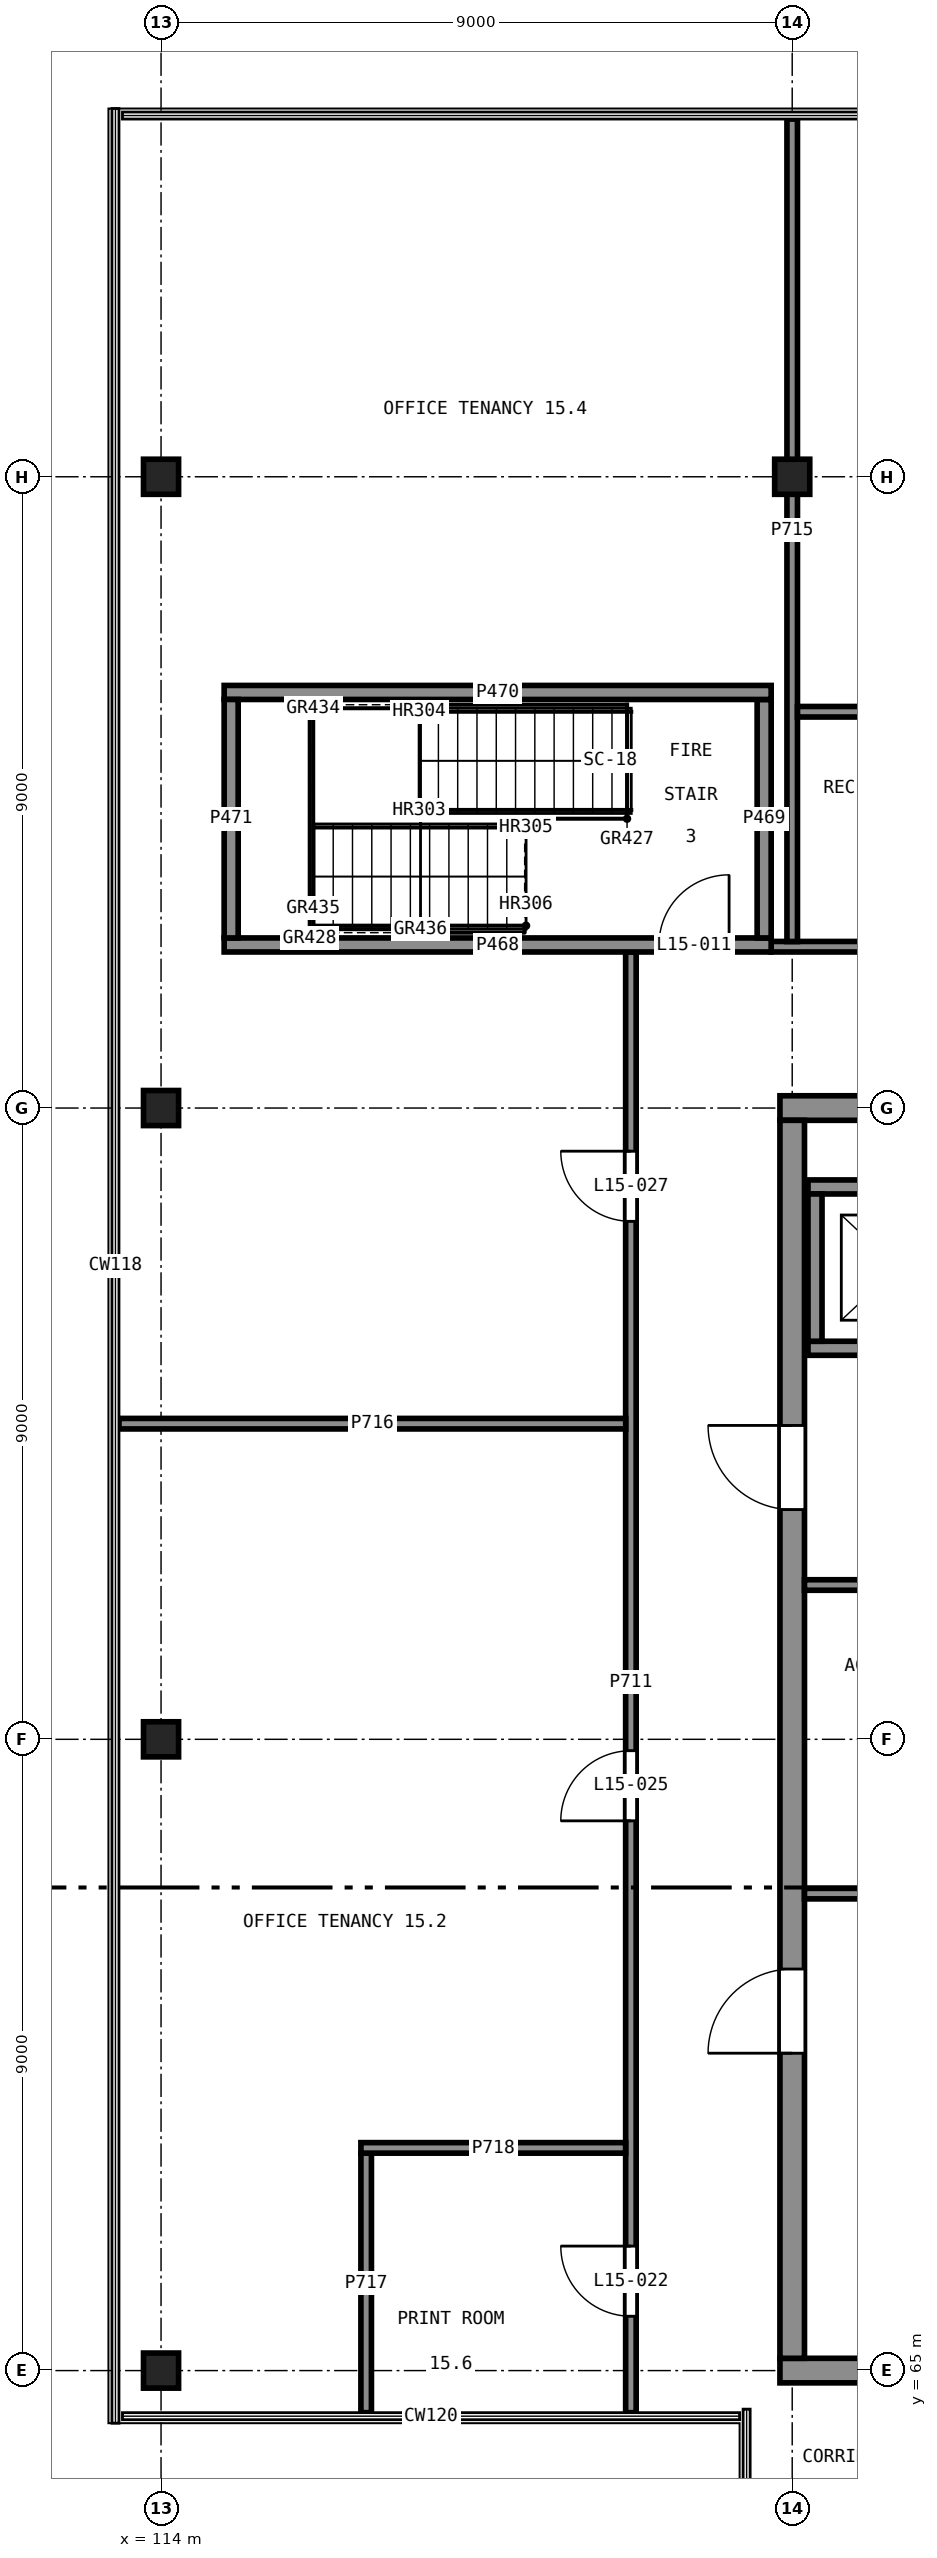
"""IFC4 building model, lengths in metres.
Left out: names, types, materials, properties, quantities, classifications, styles, units other than length and angle.
Written with IfcOpenShell. Run it as: python <this file> out.ifc"""

import sys

from ifc_helpers import new_model, si_unit, direction, frame, frame_2d, origin, origin_2d, place, context, subcontext, project, spatial, rectangle, extrude, element, fill, save


model = new_model("IFC4")
c1 = context("Model", 3, precision=1e-05, world=origin(), true_north=direction((0.0, 1.0)))
c2 = subcontext(c1, "Body", "Model", "MODEL_VIEW")
j1 = project(units=[si_unit("LENGTHUNIT", "METRE"), si_unit("PLANEANGLEUNIT", "RADIAN")], contexts=[c1])
p1 = place(None, origin())
s1 = spatial("IfcSite", under=j1, at=p1, CompositionType="ELEMENT")
p2 = place(p1, origin())
s2 = spatial("IfcBuilding", under=s1, at=p2, CompositionType="ELEMENT")
p3 = place(p2, frame((0.0, 0.0, 61.5)))
s3 = spatial("IfcBuildingStorey", under=s2, at=p3, CompositionType="ELEMENT", Elevation=61.5)
for number, where, z_axis, x_axis in (
    (1, (114.0, 65.0, 0.0), (0.0, 0.0, 1.0), (1.0, 0.0, 0.0)),
    (2, (114.0, 74.0, 0.0), (0.0, 0.0, 1.0), (1.0, 0.0, 0.0)),
    (3, (114.0, 83.0, 0.0), (0.0, 0.0, 1.0), (1.0, 0.0, 0.0)),
    (4, (114.0, 92.0, 0.0), (0.0, 0.0, 1.0), (1.0, 0.0, 0.0)),
    (5, (123.0, 92.0, 0.0), (0.0, 0.0, 1.0), (1.0, 0.0, 0.0)),
):
    element("IfcColumn", number, at=place(p3, frame(where, z_axis=z_axis, x_axis=x_axis)), inside=s3, PredefinedType="COLUMN", context=c2, shape_type="SweptSolid", body=[
        extrude(rectangle(XDim=0.5, YDim=0.5, at=origin_2d()), origin(), (0.0, 0.0, 1.0), 4.0),
    ])
for number, where, z_axis, x_axis in (
    (6, (122.825, 65.0, 0.0), (0.0, 0.0, 1.0), (1.0, 0.0, 0.0)),
    (7, (141.175, 83.0, 0.0), (0.0, 0.0, 1.0), (-1.0, 0.0, 0.0)),
):
    element("IfcWall", number, at=place(p3, frame(where, z_axis=z_axis, x_axis=x_axis)), inside=s3, PredefinedType="SHEAR", context=c2, shape_type="SweptSolid", body=[
        extrude(rectangle(XDim=18.35, YDim=0.35, at=frame_2d((9.175, 0.0))), origin(), (0.0, 0.0, 1.0), 4.0),
    ])
p4 = place(p3, frame((123.0, 82.825, 0.0), z_axis=(0.0, 0.0, 1.0), x_axis=(0.0, -1.0, 0.0)))
e8 = element("IfcWall", 8, at=p4, inside=s3, PredefinedType="SHEAR", context=c2, shape_type="SweptSolid", body=[
    extrude(rectangle(XDim=17.65, YDim=0.35, at=frame_2d((8.825, 0.0))), origin(), (0.0, 0.0, 1.0), 4.0),
])
p5 = place(p4, frame((12.1, 0.0, 0.0)))
e9 = element("IfcOpeningElement", 9, at=p5, cuts=e8, PredefinedType="OPENING", context=c2, shape_type="SweptSolid", body=[
    extrude(rectangle(XDim=1.2, YDim=2.1, at=frame_2d((0.6, 1.05))), frame((0.0, 0.185, 0.0), z_axis=(0.0, -1.0, 0.0), x_axis=(1.0, 0.0, 0.0)), (0.0, 0.0, 1.0), 0.37),
])
p6 = place(p4, frame((4.35, 0.0, 0.0)))
e10 = element("IfcOpeningElement", 10, at=p6, cuts=e8, PredefinedType="OPENING", context=c2, shape_type="SweptSolid", body=[
    extrude(rectangle(XDim=1.2, YDim=2.1, at=frame_2d((0.6, 1.05))), frame((0.0, 0.185, 0.0), z_axis=(0.0, -1.0, 0.0), x_axis=(1.0, 0.0, 0.0)), (0.0, 0.0, 1.0), 0.37),
])
p7 = place(p3, frame((123.225, 79.575, 0.0), z_axis=(0.0, 0.0, 1.0), x_axis=(1.0, 0.0, 0.0)))
e11 = element("IfcWall", 11, at=p7, inside=s3, PredefinedType="SHEAR", context=c2, shape_type="SweptSolid", body=[
    extrude(rectangle(XDim=2.55, YDim=0.2, at=frame_2d((1.275, 0.0))), origin(), (0.0, 0.0, 1.0), 4.0),
])
p8 = place(p7, frame((0.725, 0.0, 0.0)))
e12 = element("IfcOpeningElement", 12, at=p8, cuts=e11, PredefinedType="OPENING", context=c2, shape_type="SweptSolid", body=[
    extrude(rectangle(XDim=1.1, YDim=2.1, at=frame_2d((0.55, 1.05))), frame((0.0, 0.11, 0.0), z_axis=(0.0, -1.0, 0.0), x_axis=(1.0, 0.0, 0.0)), (0.0, 0.0, 1.0), 0.22),
])
p9 = place(p3, frame((125.775, 81.875, 0.0), z_axis=(0.0, 0.0, 1.0), x_axis=(-1.0, 0.0, 0.0)))
e13 = element("IfcWall", 13, at=p9, inside=s3, PredefinedType="SHEAR", context=c2, shape_type="SweptSolid", body=[
    extrude(rectangle(XDim=2.55, YDim=0.2, at=frame_2d((1.275, 0.0))), origin(), (0.0, 0.0, 1.0), 4.0),
])
p10 = place(p3, frame((123.325, 81.775, 0.0), z_axis=(0.0, 0.0, 1.0), x_axis=(0.0, -1.0, 0.0)))
e14 = element("IfcWall", 14, at=p10, inside=s3, PredefinedType="SHEAR", context=c2, shape_type="SweptSolid", body=[
    extrude(rectangle(XDim=2.1, YDim=0.2, at=frame_2d((1.05, 0.0))), origin(), (0.0, 0.0, 1.0), 4.0),
])
p11 = place(p3, frame((114.9, 85.325, 0.0), z_axis=(0.0, 0.0, 1.0), x_axis=(1.0, 0.0, 0.0)))
e15 = element("IfcWall", 15, at=p11, inside=s3, PredefinedType="SHEAR", context=c2, shape_type="SweptSolid", body=[
    extrude(rectangle(XDim=7.8, YDim=0.2, at=frame_2d((3.9, 0.0))), origin(), (0.0, 0.0, 1.0), 3.58),
])
p12 = place(p11, frame((6.2, 0.0, 0.0)))
e16 = element("IfcOpeningElement", 16, at=p12, cuts=e15, PredefinedType="OPENING", context=c2, shape_type="SweptSolid", body=[
    extrude(rectangle(XDim=1.0, YDim=2.1, at=frame_2d((0.5, 1.05))), frame((0.0, 0.11, 0.0), z_axis=(0.0, -1.0, 0.0), x_axis=(1.0, 0.0, 0.0)), (0.0, 0.0, 1.0), 0.22),
])
p13 = place(p3, frame((122.6, 85.425, 0.0), z_axis=(0.0, 0.0, 1.0), x_axis=(0.0, 1.0, 0.0)))
e17 = element("IfcWall", 17, at=p13, inside=s3, PredefinedType="SHEAR", context=c2, shape_type="SweptSolid", body=[
    extrude(rectangle(XDim=3.4, YDim=0.2, at=frame_2d((1.7, 0.0))), origin(), (0.0, 0.0, 1.0), 3.58),
])
p14 = place(p3, frame((122.7, 88.925, 0.0), z_axis=(0.0, 0.0, 1.0), x_axis=(-1.0, 0.0, 0.0)))
e18 = element("IfcWall", 18, at=p14, inside=s3, PredefinedType="SHEAR", context=c2, shape_type="SweptSolid", body=[
    extrude(rectangle(XDim=7.8, YDim=0.2, at=frame_2d((3.9, 0.0))), origin(), (0.0, 0.0, 1.0), 3.58),
])
p15 = place(p3, frame((115.0, 88.825, 0.0), z_axis=(0.0, 0.0, 1.0), x_axis=(0.0, -1.0, 0.0)))
e19 = element("IfcWall", 19, at=p15, inside=s3, PredefinedType="SHEAR", context=c2, shape_type="SweptSolid", body=[
    extrude(rectangle(XDim=3.4, YDim=0.2, at=frame_2d((1.7, 0.0))), origin(), (0.0, 0.0, 1.0), 3.58),
])
p16 = place(p3, frame((123.175, 71.8, 0.0), z_axis=(0.0, 0.0, 1.0), x_axis=(1.0, 0.0, 0.0)))
e20 = element("IfcWall", 20, at=p16, inside=s3, PredefinedType="PARTITIONING", context=c2, shape_type="SweptSolid", body=[
    extrude(rectangle(XDim=2.575, YDim=0.15, at=frame_2d((1.288, 0.0))), origin(), (0.0, 0.0, 1.0), 3.58),
])
p17 = place(p16, frame((0.85, 0.0, 0.0)))
e21 = element("IfcOpeningElement", 21, at=p17, cuts=e20, PredefinedType="OPENING", context=c2, shape_type="SweptSolid", body=[
    extrude(rectangle(XDim=1.0, YDim=2.1, at=frame_2d((0.5, 1.05))), frame((0.0, 0.085, 0.0), z_axis=(0.0, -1.0, 0.0), x_axis=(1.0, 0.0, 0.0)), (0.0, 0.0, 1.0), 0.17),
])
p18 = place(p3, frame((123.175, 76.2, 0.0), z_axis=(0.0, 0.0, 1.0), x_axis=(1.0, 0.0, 0.0)))
e22 = element("IfcWall", 22, at=p18, inside=s3, PredefinedType="PARTITIONING", context=c2, shape_type="SweptSolid", body=[
    extrude(rectangle(XDim=2.575, YDim=0.15, at=frame_2d((1.288, 0.0))), origin(), (0.0, 0.0, 1.0), 3.58),
])
p19 = place(p3, frame((120.7, 64.4, 0.0), z_axis=(0.0, 0.0, 1.0), x_axis=(0.0, 1.0, 0.0)))
e23 = element("IfcWall", 23, at=p19, inside=s3, PredefinedType="PARTITIONING", context=c2, shape_type="SweptSolid", body=[
    extrude(rectangle(XDim=20.825, YDim=0.15, at=frame_2d((10.413, 0.0))), origin(), (0.0, 0.0, 1.0), 3.58),
])
p20 = place(p19, frame((1.375, 0.0, 0.0)))
e24 = element("IfcOpeningElement", 24, at=p20, cuts=e23, PredefinedType="OPENING", context=c2, shape_type="SweptSolid", body=[
    extrude(rectangle(XDim=1.0, YDim=2.1, at=frame_2d((0.5, 1.05))), frame((0.0, 0.085, 0.0), z_axis=(0.0, -1.0, 0.0), x_axis=(1.0, 0.0, 0.0)), (0.0, 0.0, 1.0), 0.17),
])
p21 = place(p19, frame((8.438, 0.0, 0.0)))
e25 = element("IfcOpeningElement", 25, at=p21, cuts=e23, PredefinedType="OPENING", context=c2, shape_type="SweptSolid", body=[
    extrude(rectangle(XDim=1.0, YDim=2.1, at=frame_2d((0.5, 1.05))), frame((0.0, 0.085, 0.0), z_axis=(0.0, -1.0, 0.0), x_axis=(1.0, 0.0, 0.0)), (0.0, 0.0, 1.0), 0.17),
])
p22 = place(p19, frame((16.985, 0.0, 0.0)))
e26 = element("IfcOpeningElement", 26, at=p22, cuts=e23, PredefinedType="OPENING", context=c2, shape_type="SweptSolid", body=[
    extrude(rectangle(XDim=1.0, YDim=2.1, at=frame_2d((0.5, 1.05))), frame((0.0, 0.085, 0.0), z_axis=(0.0, -1.0, 0.0), x_axis=(1.0, 0.0, 0.0)), (0.0, 0.0, 1.0), 0.17),
])
p23 = place(p3, frame((122.7, 85.3, 0.0), z_axis=(0.0, 0.0, 1.0), x_axis=(1.0, 0.0, 0.0)))
e27 = element("IfcWall", 27, at=p23, inside=s3, PredefinedType="PARTITIONING", context=c2, shape_type="SweptSolid", body=[
    extrude(rectangle(XDim=9.9, YDim=0.15, at=frame_2d((4.95, 0.0))), origin(), (0.0, 0.0, 1.0), 3.58),
])
p24 = place(p23, frame((1.875, 0.0, 0.0)))
e28 = element("IfcOpeningElement", 28, at=p24, cuts=e27, PredefinedType="OPENING", context=c2, shape_type="SweptSolid", body=[
    extrude(rectangle(XDim=1.0, YDim=2.1, at=frame_2d((0.5, 1.05))), frame((0.0, 0.085, 0.0), z_axis=(0.0, -1.0, 0.0), x_axis=(1.0, 0.0, 0.0)), (0.0, 0.0, 1.0), 0.17),
])
p25 = place(p23, frame((6.698, 0.0, 0.0)))
e29 = element("IfcOpeningElement", 29, at=p25, cuts=e27, PredefinedType="OPENING", context=c2, shape_type="SweptSolid", body=[
    extrude(rectangle(XDim=1.0, YDim=2.1, at=frame_2d((0.5, 1.05))), frame((0.0, 0.085, 0.0), z_axis=(0.0, -1.0, 0.0), x_axis=(1.0, 0.0, 0.0)), (0.0, 0.0, 1.0), 0.17),
])
p26 = place(p3, frame((123.0, 85.374, 0.0), z_axis=(0.0, 0.0, 1.0), x_axis=(0.0, 1.0, 0.0)))
e30 = element("IfcWall", 30, at=p26, inside=s3, PredefinedType="PARTITIONING", context=c2, shape_type="SweptSolid", body=[
    extrude(rectangle(XDim=11.726, YDim=0.15, at=frame_2d((5.863, 0.0))), origin(), (0.0, 0.0, 1.0), 2.68),
])
p27 = place(p3, frame((113.4, 78.5, 0.0), z_axis=(0.0, 0.0, 1.0), x_axis=(1.0, 0.0, 0.0)))
e31 = element("IfcWall", 31, at=p27, inside=s3, PredefinedType="PARTITIONING", context=c2, shape_type="SweptSolid", body=[
    extrude(rectangle(XDim=7.226, YDim=0.15, at=frame_2d((3.613, 0.0))), origin(), (0.0, 0.0, 1.0), 3.58),
])
p28 = place(p3, frame((116.925, 64.4, 0.0), z_axis=(0.0, 0.0, 1.0), x_axis=(0.0, 1.0, 0.0)))
e32 = element("IfcWall", 32, at=p28, inside=s3, PredefinedType="PARTITIONING", context=c2, shape_type="SweptSolid", body=[
    extrude(rectangle(XDim=3.7, YDim=0.15, at=frame_2d((1.85, 0.0))), origin(), (0.0, 0.0, 1.0), 3.58),
])
p29 = place(p3, frame((120.625, 68.175, 0.0), z_axis=(0.0, 0.0, 1.0), x_axis=(-1.0, 0.0, 0.0)))
e33 = element("IfcWall", 33, at=p29, inside=s3, PredefinedType="PARTITIONING", context=c2, shape_type="SweptSolid", body=[
    extrude(rectangle(XDim=3.775, YDim=0.15, at=frame_2d((1.887, 0.0))), origin(), (0.0, 0.0, 1.0), 3.58),
])
p30 = place(p3, frame((123.075, 88.65, 0.0), z_axis=(0.0, 0.0, 1.0), x_axis=(1.0, 0.0, 0.0)))
e34 = element("IfcWall", 34, at=p30, inside=s3, PredefinedType="PARTITIONING", context=c2, shape_type="SweptSolid", body=[
    extrude(rectangle(XDim=4.0, YDim=0.15, at=frame_2d((2.0, 0.0))), origin(), (0.0, 0.0, 1.0), 3.58),
])
p31 = place(p12, origin())
e35 = element("IfcDoor", 35, at=p31, inside=s3, OperationType="SINGLE_SWING_LEFT", PredefinedType="DOOR", context=c2, shape_type="SweptSolid", body=[
    extrude(rectangle(XDim=1.0, YDim=2.1, at=frame_2d((0.5, 1.05))), frame((0.0, 0.025, 0.0), z_axis=(0.0, -1.0, 0.0), x_axis=(1.0, 0.0, 0.0)), (0.0, 0.0, 1.0), 0.05),
])
fill(e16, e35)
p32 = place(p5, frame((1.2, 0.0, 0.0), z_axis=(0.0, 0.0, 1.0), x_axis=(-1.0, 0.0, 0.0)))
e36 = element("IfcDoor", 36, at=p32, inside=s3, OperationType="SINGLE_SWING_RIGHT", PredefinedType="DOOR", context=c2, shape_type="SweptSolid", body=[
    extrude(rectangle(XDim=1.2, YDim=2.1, at=frame_2d((0.6, 1.05))), frame((0.0, 0.025, 0.0), z_axis=(0.0, -1.0, 0.0), x_axis=(1.0, 0.0, 0.0)), (0.0, 0.0, 1.0), 0.05),
])
fill(e9, e36)
p33 = place(p6, frame((1.2, 0.0, 0.0), z_axis=(0.0, 0.0, 1.0), x_axis=(-1.0, 0.0, 0.0)))
e37 = element("IfcDoor", 37, at=p33, inside=s3, OperationType="SINGLE_SWING_LEFT", PredefinedType="DOOR", context=c2, shape_type="SweptSolid", body=[
    extrude(rectangle(XDim=1.2, YDim=2.1, at=frame_2d((0.6, 1.05))), frame((0.0, 0.025, 0.0), z_axis=(0.0, -1.0, 0.0), x_axis=(1.0, 0.0, 0.0)), (0.0, 0.0, 1.0), 0.05),
])
fill(e10, e37)
p34 = place(p20, origin())
e38 = element("IfcDoor", 38, at=p34, inside=s3, OperationType="SINGLE_SWING_LEFT", PredefinedType="DOOR", context=c2, shape_type="SweptSolid", body=[
    extrude(rectangle(XDim=1.0, YDim=2.1, at=frame_2d((0.5, 1.05))), frame((0.0, 0.025, 0.0), z_axis=(0.0, -1.0, 0.0), x_axis=(1.0, 0.0, 0.0)), (0.0, 0.0, 1.0), 0.05),
])
fill(e24, e38)
p35 = place(p21, origin())
e39 = element("IfcDoor", 39, at=p35, inside=s3, OperationType="SINGLE_SWING_RIGHT", PredefinedType="DOOR", context=c2, shape_type="SweptSolid", body=[
    extrude(rectangle(XDim=1.0, YDim=2.1, at=frame_2d((0.5, 1.05))), frame((0.0, 0.025, 0.0), z_axis=(0.0, -1.0, 0.0), x_axis=(1.0, 0.0, 0.0)), (0.0, 0.0, 1.0), 0.05),
])
fill(e25, e39)
p36 = place(p22, origin())
e40 = element("IfcDoor", 40, at=p36, inside=s3, OperationType="SINGLE_SWING_LEFT", PredefinedType="DOOR", context=c2, shape_type="SweptSolid", body=[
    extrude(rectangle(XDim=1.0, YDim=2.1, at=frame_2d((0.5, 1.05))), frame((0.0, 0.025, 0.0), z_axis=(0.0, -1.0, 0.0), x_axis=(1.0, 0.0, 0.0)), (0.0, 0.0, 1.0), 0.05),
])
fill(e26, e40)
save(model, sys.argv[1])
